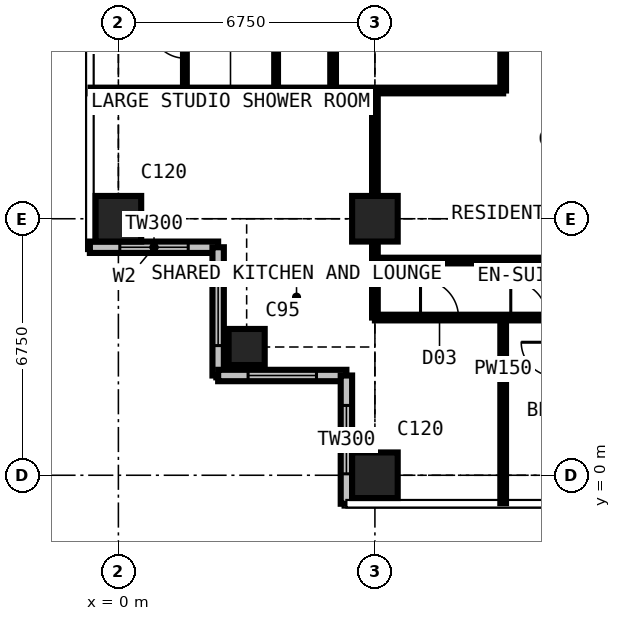
"""IFC4 building model, lengths in metres.
Left out: names, types, materials, properties, quantities, classifications, styles, units other than length and angle.
Written with IfcOpenShell. Run it as: python <this file> out.ifc"""

import sys

from ifc_helpers import new_model, si_unit, direction, frame, frame_2d, origin, origin_2d, place, context, subcontext, project, spatial, rectangle, extrude, element, fill, save


model = new_model("IFC4")
c1 = context("Model", 3, precision=1e-05, world=origin(), true_north=direction((0.0, 1.0)))
c2 = subcontext(c1, "Body", "Model", "MODEL_VIEW")
j1 = project(units=[si_unit("LENGTHUNIT", "METRE"), si_unit("PLANEANGLEUNIT", "RADIAN")], contexts=[c1])
p1 = place(None, origin())
s1 = spatial("IfcSite", under=j1, at=p1, CompositionType="ELEMENT")
p2 = place(p1, origin())
s2 = spatial("IfcBuilding", under=s1, at=p2, CompositionType="ELEMENT")
p3 = place(p2, frame((0.0, 0.0, 174.6)))
s3 = spatial("IfcBuildingStorey", under=s2, at=p3, CompositionType="ELEMENT", Elevation=174.6)
p4 = place(p3, frame((0.0, 6.75, 0.0), z_axis=(0.0, 0.0, 1.0), x_axis=(1.0, 0.0, 0.0)))
e1 = element("IfcColumn", 1, at=p4, inside=s3, PredefinedType="COLUMN", context=c2, shape_type="SweptSolid", body=[
    extrude(rectangle(XDim=1.2, YDim=1.2, at=origin_2d()), origin(), (0.0, 0.0, 1.0), 3.6),
])
p5 = place(p3, frame((3.375, 3.375, 0.0), z_axis=(0.0, 0.0, 1.0), x_axis=(1.0, 0.0, 0.0)))
e2 = element("IfcColumn", 2, at=p5, inside=s3, PredefinedType="COLUMN", context=c2, shape_type="SweptSolid", body=[
    extrude(rectangle(XDim=0.95, YDim=0.95, at=origin_2d()), origin(), (0.0, 0.0, 1.0), 3.6),
])
for number, where, z_axis, x_axis in (
    (3, (6.75, 0.0, 0.0), (0.0, 0.0, 1.0), (1.0, 0.0, 0.0)),
    (4, (6.75, 6.75, 0.0), (0.0, 0.0, 1.0), (1.0, 0.0, 0.0)),
):
    element("IfcColumn", number, at=place(p3, frame(where, z_axis=z_axis, x_axis=x_axis)), inside=s3, PredefinedType="COLUMN", context=c2, shape_type="SweptSolid", body=[
        extrude(rectangle(XDim=1.2, YDim=1.2, at=origin_2d()), origin(), (0.0, 0.0, 1.0), 3.6),
    ])
p6 = place(p3, frame((-0.75, 6.0, 0.0), z_axis=(0.0, 0.0, 1.0), x_axis=(1.0, 0.0, 0.0)))
e5 = element("IfcWall", 5, at=p6, inside=s3, PredefinedType="SOLIDWALL", context=c2, shape_type="SweptSolid", body=[
    extrude(rectangle(XDim=3.375, YDim=0.3, at=frame_2d((1.688, 0.0))), origin(), (0.0, 0.0, 1.0), 3.375),
])
p7 = place(p6, frame((0.788, 0.0, 0.6)))
e6 = element("IfcOpeningElement", 6, at=p7, cuts=e5, PredefinedType="OPENING", context=c2, shape_type="SweptSolid", body=[
    extrude(rectangle(XDim=1.8, YDim=2.1, at=frame_2d((0.9, 1.05))), frame((0.0, 0.16, 0.0), z_axis=(0.0, -1.0, 0.0), x_axis=(1.0, 0.0, 0.0)), (0.0, 0.0, 1.0), 0.32),
])
p8 = place(p3, frame((2.625, 6.0, 0.0), z_axis=(0.0, 0.0, 1.0), x_axis=(0.0, -1.0, 0.0)))
e7 = element("IfcWall", 7, at=p8, inside=s3, PredefinedType="SOLIDWALL", context=c2, shape_type="SweptSolid", body=[
    extrude(rectangle(XDim=3.375, YDim=0.3, at=frame_2d((1.688, 0.0))), origin(), (0.0, 0.0, 1.0), 3.375),
])
p9 = place(p8, frame((0.788, 0.0, 0.6)))
e8 = element("IfcOpeningElement", 8, at=p9, cuts=e7, PredefinedType="OPENING", context=c2, shape_type="SweptSolid", body=[
    extrude(rectangle(XDim=1.8, YDim=2.1, at=frame_2d((0.9, 1.05))), frame((0.0, 0.16, 0.0), z_axis=(0.0, -1.0, 0.0), x_axis=(1.0, 0.0, 0.0)), (0.0, 0.0, 1.0), 0.32),
])
p10 = place(p3, frame((2.625, 2.625, 0.0), z_axis=(0.0, 0.0, 1.0), x_axis=(1.0, 0.0, 0.0)))
e9 = element("IfcWall", 9, at=p10, inside=s3, PredefinedType="SOLIDWALL", context=c2, shape_type="SweptSolid", body=[
    extrude(rectangle(XDim=3.375, YDim=0.3, at=frame_2d((1.688, 0.0))), origin(), (0.0, 0.0, 1.0), 3.375),
])
p11 = place(p10, frame((0.788, 0.0, 0.6)))
e10 = element("IfcOpeningElement", 10, at=p11, cuts=e9, PredefinedType="OPENING", context=c2, shape_type="SweptSolid", body=[
    extrude(rectangle(XDim=1.8, YDim=2.1, at=frame_2d((0.9, 1.05))), frame((0.0, 0.16, 0.0), z_axis=(0.0, -1.0, 0.0), x_axis=(1.0, 0.0, 0.0)), (0.0, 0.0, 1.0), 0.32),
])
p12 = place(p3, frame((6.0, 2.625, 0.0), z_axis=(0.0, 0.0, 1.0), x_axis=(0.0, -1.0, 0.0)))
e11 = element("IfcWall", 11, at=p12, inside=s3, PredefinedType="SOLIDWALL", context=c2, shape_type="SweptSolid", body=[
    extrude(rectangle(XDim=3.375, YDim=0.3, at=frame_2d((1.688, 0.0))), origin(), (0.0, 0.0, 1.0), 3.375),
])
p13 = place(p12, frame((0.788, 0.0, 0.6)))
e12 = element("IfcOpeningElement", 12, at=p13, cuts=e11, PredefinedType="OPENING", context=c2, shape_type="SweptSolid", body=[
    extrude(rectangle(XDim=1.8, YDim=2.1, at=frame_2d((0.9, 1.05))), frame((0.0, 0.16, 0.0), z_axis=(0.0, -1.0, 0.0), x_axis=(1.0, 0.0, 0.0)), (0.0, 0.0, 1.0), 0.32),
])
p14 = place(p3, frame((-0.734, 10.125, 0.0), z_axis=(0.0, 0.0, 1.0), x_axis=(1.0, 0.0, 0.0)))
e13 = element("IfcWall", 13, at=p14, inside=s3, PredefinedType="PARTITIONING", context=c2, shape_type="SweptSolid", body=[
    extrude(rectangle(XDim=10.859, YDim=0.15, at=frame_2d((5.429, 0.0))), origin(), (0.0, 0.0, 1.0), 3.375),
])
p15 = place(p3, frame((1.75, 10.125, 0.0), z_axis=(0.0, 0.0, 1.0), x_axis=(0.0, 1.0, 0.0)))
e14 = element("IfcWall", 14, at=p15, inside=s3, PredefinedType="PARTITIONING", context=c2, shape_type="SweptSolid", body=[
    extrude(rectangle(XDim=2.6, YDim=0.1, at=frame_2d((1.3, 0.0))), origin(), (0.0, 0.0, 1.0), 3.375),
])
p16 = place(p15, frame((0.85, 0.0, 0.0)))
e15 = element("IfcOpeningElement", 15, at=p16, cuts=e14, PredefinedType="OPENING", context=c2, shape_type="SweptSolid", body=[
    extrude(rectangle(XDim=0.9, YDim=2.2, at=frame_2d((0.45, 1.1))), frame((0.0, 0.06, 0.0), z_axis=(0.0, -1.0, 0.0), x_axis=(1.0, 0.0, 0.0)), (0.0, 0.0, 1.0), 0.12),
])
p17 = place(p3, frame((4.15, 10.125, 0.0), z_axis=(0.0, 0.0, 1.0), x_axis=(0.0, 1.0, 0.0)))
e16 = element("IfcWall", 16, at=p17, inside=s3, PredefinedType="PARTITIONING", context=c2, shape_type="SweptSolid", body=[
    extrude(rectangle(XDim=16.875, YDim=0.1, at=frame_2d((8.438, 0.0))), origin(), (0.0, 0.0, 1.0), 3.375),
])
p18 = place(p17, frame((4.2, 0.0, 0.0)))
e17 = element("IfcOpeningElement", 17, at=p18, cuts=e16, PredefinedType="OPENING", context=c2, shape_type="SweptSolid", body=[
    extrude(rectangle(XDim=0.95, YDim=2.2, at=frame_2d((0.475, 1.1))), frame((0.0, 0.06, 0.0), z_axis=(0.0, -1.0, 0.0), x_axis=(1.0, 0.0, 0.0)), (0.0, 0.0, 1.0), 0.12),
])
p19 = place(p17, frame((10.95, 0.0, 0.0)))
e18 = element("IfcOpeningElement", 18, at=p19, cuts=e16, PredefinedType="OPENING", context=c2, shape_type="SweptSolid", body=[
    extrude(rectangle(XDim=0.95, YDim=2.2, at=frame_2d((0.475, 1.1))), frame((0.0, 0.06, 0.0), z_axis=(0.0, -1.0, 0.0), x_axis=(1.0, 0.0, 0.0)), (0.0, 0.0, 1.0), 0.12),
])
p20 = place(p3, frame((5.65, 10.125, 0.0), z_axis=(0.0, 0.0, 1.0), x_axis=(0.0, 1.0, 0.0)))
e19 = element("IfcWall", 19, at=p20, inside=s3, PredefinedType="PARTITIONING", context=c2, shape_type="SweptSolid", body=[
    extrude(rectangle(XDim=10.762, YDim=0.15, at=frame_2d((5.381, 0.0))), origin(), (0.0, 0.0, 1.0), 3.375),
])
p21 = place(p20, frame((4.9, 0.0, 0.0)))
e20 = element("IfcOpeningElement", 20, at=p21, cuts=e19, PredefinedType="OPENING", context=c2, shape_type="SweptSolid", body=[
    extrude(rectangle(XDim=0.95, YDim=2.2, at=frame_2d((0.475, 1.1))), frame((0.0, 0.085, 0.0), z_axis=(0.0, -1.0, 0.0), x_axis=(1.0, 0.0, 0.0)), (0.0, 0.0, 1.0), 0.17),
])
p22 = place(p3, frame((6.75, 4.15, 0.0), z_axis=(0.0, 0.0, 1.0), x_axis=(0.0, 1.0, 0.0)))
e21 = element("IfcWall", 21, at=p22, inside=s3, PredefinedType="PARTITIONING", context=c2, shape_type="SweptSolid", body=[
    extrude(rectangle(XDim=5.975, YDim=0.15, at=frame_2d((2.988, 0.0))), origin(), (0.0, 0.0, 1.0), 2.877),
])
p23 = place(p3, frame((6.75, 4.15, 0.0), z_axis=(0.0, 0.0, 1.0), x_axis=(1.0, 0.0, 0.0)))
e22 = element("IfcWall", 22, at=p23, inside=s3, PredefinedType="PARTITIONING", context=c2, shape_type="SweptSolid", body=[
    extrude(rectangle(XDim=20.25, YDim=0.15, at=frame_2d((10.125, 0.0))), origin(), (0.0, 0.0, 1.0), 3.375),
])
p24 = place(p23, frame((1.2, 0.0, 0.0)))
e23 = element("IfcOpeningElement", 23, at=p24, cuts=e22, PredefinedType="OPENING", context=c2, shape_type="SweptSolid", body=[
    extrude(rectangle(XDim=1.0, YDim=2.2, at=frame_2d((0.5, 1.1))), frame((0.0, 0.085, 0.0), z_axis=(0.0, -1.0, 0.0), x_axis=(1.0, 0.0, 0.0)), (0.0, 0.0, 1.0), 0.17),
])
p25 = place(p23, frame((3.575, 0.0, 0.0)))
e24 = element("IfcOpeningElement", 24, at=p25, cuts=e22, PredefinedType="OPENING", context=c2, shape_type="SweptSolid", body=[
    extrude(rectangle(XDim=0.95, YDim=2.2, at=frame_2d((0.475, 1.1))), frame((0.0, 0.085, 0.0), z_axis=(0.0, -1.0, 0.0), x_axis=(1.0, 0.0, 0.0)), (0.0, 0.0, 1.0), 0.17),
])
p26 = place(p23, frame((7.0, 0.0, 0.0)))
e25 = element("IfcOpeningElement", 25, at=p26, cuts=e22, PredefinedType="OPENING", context=c2, shape_type="SweptSolid", body=[
    extrude(rectangle(XDim=0.95, YDim=2.2, at=frame_2d((0.475, 1.1))), frame((0.0, 0.085, 0.0), z_axis=(0.0, -1.0, 0.0), x_axis=(1.0, 0.0, 0.0)), (0.0, 0.0, 1.0), 0.17),
])
p27 = place(p23, frame((10.375, 0.0, 0.0)))
e26 = element("IfcOpeningElement", 26, at=p27, cuts=e22, PredefinedType="OPENING", context=c2, shape_type="SweptSolid", body=[
    extrude(rectangle(XDim=0.95, YDim=2.2, at=frame_2d((0.475, 1.1))), frame((0.0, 0.085, 0.0), z_axis=(0.0, -1.0, 0.0), x_axis=(1.0, 0.0, 0.0)), (0.0, 0.0, 1.0), 0.17),
])
p28 = place(p23, frame((15.1, 0.0, 0.0)))
e27 = element("IfcOpeningElement", 27, at=p28, cuts=e22, PredefinedType="OPENING", context=c2, shape_type="SweptSolid", body=[
    extrude(rectangle(XDim=0.95, YDim=2.2, at=frame_2d((0.475, 1.1))), frame((0.0, 0.085, 0.0), z_axis=(0.0, -1.0, 0.0), x_axis=(1.0, 0.0, 0.0)), (0.0, 0.0, 1.0), 0.17),
])
p29 = place(p3, frame((6.75, 5.65, 0.0), z_axis=(0.0, 0.0, 1.0), x_axis=(1.0, 0.0, 0.0)))
e28 = element("IfcWall", 28, at=p29, inside=s3, PredefinedType="PARTITIONING", context=c2, shape_type="SweptSolid", body=[
    extrude(rectangle(XDim=11.05, YDim=0.15, at=frame_2d((5.525, 0.0))), origin(), (0.0, 0.0, 1.0), 3.375),
])
p30 = place(p3, frame((10.125, -0.734, 0.0), z_axis=(0.0, 0.0, 1.0), x_axis=(0.0, 1.0, 0.0)))
e29 = element("IfcWall", 29, at=p30, inside=s3, PredefinedType="PARTITIONING", context=c2, shape_type="SweptSolid", body=[
    extrude(rectangle(XDim=4.884, YDim=0.15, at=frame_2d((2.442, 0.0))), origin(), (0.0, 0.0, 1.0), 3.375),
])
p31 = place(p3, frame((10.125, 10.125, 0.0), z_axis=(0.0, 0.0, 1.0), x_axis=(0.0, 1.0, 0.0)))
e30 = element("IfcWall", 30, at=p31, inside=s3, PredefinedType="PARTITIONING", context=c2, shape_type="SweptSolid", body=[
    extrude(rectangle(XDim=1.175, YDim=0.15, at=frame_2d((0.587, 0.0))), origin(), (0.0, 0.0, 1.0), 3.375),
])
p32 = place(p7, origin())
e31 = element("IfcWindow", 31, at=p32, inside=s3, PartitioningType="SINGLE_PANEL", PredefinedType="WINDOW", context=c2, shape_type="SweptSolid", body=[
    extrude(rectangle(XDim=1.8, YDim=2.1, at=frame_2d((0.9, 1.05))), frame((0.0, 0.03, 0.0), z_axis=(0.0, -1.0, 0.0), x_axis=(1.0, 0.0, 0.0)), (0.0, 0.0, 1.0), 0.06),
])
fill(e6, e31)
p33 = place(p9, origin())
e32 = element("IfcWindow", 32, at=p33, inside=s3, PartitioningType="SINGLE_PANEL", PredefinedType="WINDOW", context=c2, shape_type="SweptSolid", body=[
    extrude(rectangle(XDim=1.8, YDim=2.1, at=frame_2d((0.9, 1.05))), frame((0.0, 0.03, 0.0), z_axis=(0.0, -1.0, 0.0), x_axis=(1.0, 0.0, 0.0)), (0.0, 0.0, 1.0), 0.06),
])
fill(e8, e32)
p34 = place(p11, origin())
e33 = element("IfcWindow", 33, at=p34, inside=s3, PartitioningType="SINGLE_PANEL", PredefinedType="WINDOW", context=c2, shape_type="SweptSolid", body=[
    extrude(rectangle(XDim=1.8, YDim=2.1, at=frame_2d((0.9, 1.05))), frame((0.0, 0.03, 0.0), z_axis=(0.0, -1.0, 0.0), x_axis=(1.0, 0.0, 0.0)), (0.0, 0.0, 1.0), 0.06),
])
fill(e10, e33)
p35 = place(p13, origin())
e34 = element("IfcWindow", 34, at=p35, inside=s3, PartitioningType="SINGLE_PANEL", PredefinedType="WINDOW", context=c2, shape_type="SweptSolid", body=[
    extrude(rectangle(XDim=1.8, YDim=2.1, at=frame_2d((0.9, 1.05))), frame((0.0, 0.03, 0.0), z_axis=(0.0, -1.0, 0.0), x_axis=(1.0, 0.0, 0.0)), (0.0, 0.0, 1.0), 0.06),
])
fill(e12, e34)
p36 = place(p24, origin())
e35 = element("IfcDoor", 35, at=p36, inside=s3, OperationType="SINGLE_SWING_LEFT", PredefinedType="DOOR", context=c2, shape_type="SweptSolid", body=[
    extrude(rectangle(XDim=1.0, YDim=2.2, at=frame_2d((0.5, 1.1))), frame((0.0, 0.025, 0.0), z_axis=(0.0, -1.0, 0.0), x_axis=(1.0, 0.0, 0.0)), (0.0, 0.0, 1.0), 0.05),
])
fill(e23, e35)
p37 = place(p25, origin())
e36 = element("IfcDoor", 36, at=p37, inside=s3, OperationType="SINGLE_SWING_LEFT", PredefinedType="DOOR", context=c2, shape_type="SweptSolid", body=[
    extrude(rectangle(XDim=0.95, YDim=2.2, at=frame_2d((0.475, 1.1))), frame((0.0, 0.025, 0.0), z_axis=(0.0, -1.0, 0.0), x_axis=(1.0, 0.0, 0.0)), (0.0, 0.0, 1.0), 0.05),
])
fill(e24, e36)
p38 = place(p16, origin())
e37 = element("IfcDoor", 37, at=p38, inside=s3, OperationType="SINGLE_SWING_RIGHT", PredefinedType="DOOR", context=c2, shape_type="SweptSolid", body=[
    extrude(rectangle(XDim=0.9, YDim=2.2, at=frame_2d((0.45, 1.1))), frame((0.0, 0.025, 0.0), z_axis=(0.0, -1.0, 0.0), x_axis=(1.0, 0.0, 0.0)), (0.0, 0.0, 1.0), 0.05),
])
fill(e15, e37)
save(model, sys.argv[1])
